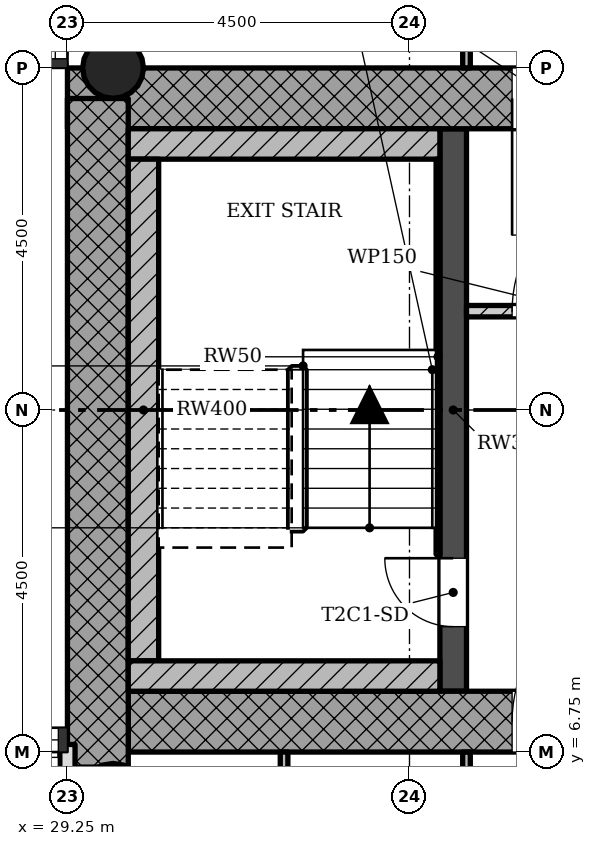
"""IFC4 building model, lengths in metres.
Left out: names, types, materials, properties, quantities, classifications, styles, units other than length and angle.
Written with IfcOpenShell. Run it as: python <this file> out.ifc"""

import sys

from ifc_helpers import new_model, si_unit, direction, frame, frame_2d, origin, origin_2d, place, context, subcontext, project, spatial, rectangle, hollow_circle, extrude, element, fill, save


model = new_model("IFC4")
c1 = context("Model", 3, precision=1e-05, world=origin(), true_north=direction((0.0, 1.0)))
c2 = subcontext(c1, "Body", "Model", "MODEL_VIEW")
j1 = project(units=[si_unit("LENGTHUNIT", "METRE"), si_unit("PLANEANGLEUNIT", "RADIAN")], contexts=[c1])
p1 = place(None, origin())
s1 = spatial("IfcSite", under=j1, at=p1, CompositionType="ELEMENT")
p2 = place(p1, origin())
s2 = spatial("IfcBuilding", under=s1, at=p2, CompositionType="ELEMENT")
p3 = place(p2, frame((0.0, 0.0, 154.1)))
s3 = spatial("IfcBuildingStorey", under=s2, at=p3, CompositionType="ELEMENT", Elevation=154.1)
p4 = place(p3, frame((30.05, 7.15, 0.0), z_axis=(0.0, 0.0, 1.0), x_axis=(1.0, 0.0, 0.0)))
e1 = element("IfcWall", 1, at=p4, inside=s3, PredefinedType="SHEAR", context=c2, shape_type="SweptSolid", body=[
    extrude(rectangle(XDim=12.7, YDim=0.8, at=frame_2d((6.35, 0.0))), origin(), (0.0, 0.0, 1.0), 3.4),
])
p5 = place(p4, frame((5.05, 0.0, 0.0)))
e2 = element("IfcOpeningElement", 2, at=p5, cuts=e1, PredefinedType="OPENING", context=c2, shape_type="SweptSolid", body=[
    extrude(rectangle(XDim=1.8, YDim=2.1, at=frame_2d((0.9, 1.05))), frame((0.0, 0.41, 0.0), z_axis=(0.0, -1.0, 0.0), x_axis=(1.0, 0.0, 0.0)), (0.0, 0.0, 1.0), 0.82),
])
p6 = place(p3, frame((41.95, 15.35, 0.0), z_axis=(0.0, 0.0, 1.0), x_axis=(-1.0, 0.0, 0.0)))
e3 = element("IfcWall", 3, at=p6, inside=s3, PredefinedType="SHEAR", context=c2, shape_type="SweptSolid", body=[
    extrude(rectangle(XDim=12.7, YDim=0.8, at=frame_2d((6.35, 0.0))), origin(), (0.0, 0.0, 1.0), 3.4),
])
p7 = place(p6, frame((5.05, 0.0, 0.0)))
e4 = element("IfcOpeningElement", 4, at=p7, cuts=e3, PredefinedType="OPENING", context=c2, shape_type="SweptSolid", body=[
    extrude(rectangle(XDim=1.8, YDim=2.1, at=frame_2d((0.9, 1.05))), frame((0.0, 0.41, 0.0), z_axis=(0.0, -1.0, 0.0), x_axis=(1.0, 0.0, 0.0)), (0.0, 0.0, 1.0), 0.82),
])
p8 = place(p3, frame((29.65, 15.348, 0.0), z_axis=(0.0, 0.0, 1.0), x_axis=(0.0, -1.0, 0.0)))
e5 = element("IfcWall", 5, at=p8, inside=s3, PredefinedType="SHEAR", context=c2, shape_type="SweptSolid", body=[
    extrude(rectangle(XDim=8.796, YDim=0.8, at=frame_2d((4.398, 0.0))), origin(), (0.0, 0.0, 1.0), 3.4),
])
p9 = place(p3, frame((34.325, 7.55, 0.0), z_axis=(0.0, 0.0, 1.0), x_axis=(0.0, 1.0, 0.0)))
e6 = element("IfcWall", 6, at=p9, inside=s3, PredefinedType="SHEAR", context=c2, shape_type="SweptSolid", body=[
    extrude(rectangle(XDim=7.4, YDim=0.35, at=frame_2d((3.7, 0.0))), origin(), (0.0, 0.0, 1.0), 3.4),
])
p10 = place(p9, frame((0.85, 0.0, 0.0)))
e7 = element("IfcOpeningElement", 7, at=p10, cuts=e6, PredefinedType="OPENING", context=c2, shape_type="SweptSolid", body=[
    extrude(rectangle(XDim=0.9, YDim=2.1, at=frame_2d((0.45, 1.05))), frame((0.0, 0.185, 0.0), z_axis=(0.0, -1.0, 0.0), x_axis=(1.0, 0.0, 0.0)), (0.0, 0.0, 1.0), 0.37),
])
p11 = place(p3, frame((29.85, 15.75, 0.0), z_axis=(0.0, 0.0, 1.0), x_axis=(1.0, 0.0, 0.0)))
e8 = element("IfcColumn", 8, at=p11, inside=s3, PredefinedType="COLUMN", context=c2, shape_type="SweptSolid", body=[
    extrude(hollow_circle(Radius=0.4, WallThickness=0.028, at=origin_2d()), origin(), (0.0, 0.0, 1.0), 3.4),
])
p12 = place(p3, frame((29.85, 6.15, 0.0), z_axis=(0.0, 0.0, 1.0), x_axis=(1.0, 0.0, 0.0)))
e9 = element("IfcColumn", 9, at=p12, inside=s3, PredefinedType="COLUMN", context=c2, shape_type="SweptSolid", body=[
    extrude(hollow_circle(Radius=0.45, WallThickness=0.032, at=origin_2d()), origin(), (0.0, 0.0, 1.0), 3.4),
])
p13 = place(p3, frame((37.5, 12.55, 0.0), z_axis=(0.0, 0.0, 1.0), x_axis=(-1.0, 0.0, 0.0)))
e10 = element("IfcWall", 10, at=p13, inside=s3, PredefinedType="PARTITIONING", context=c2, shape_type="SweptSolid", body=[
    extrude(rectangle(XDim=3.0, YDim=0.15, at=frame_2d((1.5, 0.0))), origin(), (0.0, 0.0, 1.0), 3.0),
])
p14 = place(p13, frame((0.6, 0.0, 0.0)))
e11 = element("IfcOpeningElement", 11, at=p14, cuts=e10, PredefinedType="OPENING", context=c2, shape_type="SweptSolid", body=[
    extrude(rectangle(XDim=1.8, YDim=2.1, at=frame_2d((0.9, 1.05))), frame((0.0, 0.085, 0.0), z_axis=(0.0, -1.0, 0.0), x_axis=(1.0, 0.0, 0.0)), (0.0, 0.0, 1.0), 0.17),
])
p15 = place(p3, frame((34.5, 4.5, 0.0), z_axis=(0.0, 0.0, 1.0), x_axis=(0.0, 1.0, 0.0)))
e12 = element("IfcWall", 12, at=p15, inside=s3, PredefinedType="PARTITIONING", context=c2, shape_type="SweptSolid", body=[
    extrude(rectangle(XDim=2.25, YDim=0.1, at=frame_2d((1.125, 0.0))), origin(), (0.0, 0.0, 1.0), 3.0),
])
p16 = place(p15, frame((0.675, 0.0, 0.0)))
e13 = element("IfcOpeningElement", 13, at=p16, cuts=e12, PredefinedType="OPENING", context=c2, shape_type="SweptSolid", body=[
    extrude(rectangle(XDim=0.9, YDim=2.1, at=frame_2d((0.45, 1.05))), frame((0.0, 0.06, 0.0), z_axis=(0.0, -1.0, 0.0), x_axis=(1.0, 0.0, 0.0)), (0.0, 0.0, 1.0), 0.12),
])
p17 = place(p3, frame((34.5, 15.75, 0.0), z_axis=(0.0, 0.0, 1.0), x_axis=(0.0, 1.0, 0.0)))
e14 = element("IfcWall", 14, at=p17, inside=s3, PredefinedType="PARTITIONING", context=c2, shape_type="SweptSolid", body=[
    extrude(rectangle(XDim=4.5, YDim=0.1, at=frame_2d((2.25, 0.0))), origin(), (0.0, 0.0, 1.0), 3.0),
])
p18 = place(p17, frame((1.8, 0.0, 0.0)))
e15 = element("IfcOpeningElement", 15, at=p18, cuts=e14, PredefinedType="OPENING", context=c2, shape_type="SweptSolid", body=[
    extrude(rectangle(XDim=0.9, YDim=2.1, at=frame_2d((0.45, 1.05))), frame((0.0, 0.06, 0.0), z_axis=(0.0, -1.0, 0.0), x_axis=(1.0, 0.0, 0.0)), (0.0, 0.0, 1.0), 0.12),
])
p19 = place(p3, frame((32.1, 4.5, 0.0), z_axis=(0.0, 0.0, 1.0), x_axis=(0.0, 1.0, 0.0)))
e16 = element("IfcWall", 16, at=p19, inside=s3, PredefinedType="PARTITIONING", context=c2, shape_type="SweptSolid", body=[
    extrude(rectangle(XDim=2.25, YDim=0.1, at=frame_2d((1.125, 0.0))), origin(), (0.0, 0.0, 1.0), 3.0),
])
p20 = place(p3, frame((29.25, -6.85, 0.0), z_axis=(0.0, 0.0, 1.0), x_axis=(0.0, 1.0, 0.0)))
e17 = element("IfcWall", 17, at=p20, inside=s3, PredefinedType="SOLIDWALL", context=c2, shape_type="SweptSolid", body=[
    extrude(rectangle(XDim=13.7, YDim=0.2, at=frame_2d((6.85, 0.0))), origin(), (0.0, 0.0, 1.0), 3.0),
])
p21 = place(p20, frame((6.4, 0.0, 0.0)))
e18 = element("IfcOpeningElement", 18, at=p21, cuts=e17, PredefinedType="OPENING", context=c2, shape_type="SweptSolid", body=[
    extrude(rectangle(XDim=0.9, YDim=2.1, at=frame_2d((0.45, 1.05))), frame((0.0, 0.11, 0.0), z_axis=(0.0, -1.0, 0.0), x_axis=(1.0, 0.0, 0.0)), (0.0, 0.0, 1.0), 0.22),
])
p22 = place(p3, frame((34.15, 14.75, 0.0), z_axis=(0.0, 0.0, 1.0), x_axis=(-1.0, 0.0, 0.0)))
e19 = element("IfcWall", 19, at=p22, inside=s3, PredefinedType="SHEAR", context=c2, shape_type="SweptSolid", body=[
    extrude(rectangle(XDim=4.1, YDim=0.4, at=frame_2d((2.05, 0.0))), origin(), (0.0, 0.0, 1.0), 3.4),
])
p23 = place(p3, frame((30.25, 7.95, 0.0), z_axis=(0.0, 0.0, 1.0), x_axis=(0.0, 1.0, 0.0)))
e20 = element("IfcWall", 20, at=p23, inside=s3, PredefinedType="SHEAR", context=c2, shape_type="SweptSolid", body=[
    extrude(rectangle(XDim=6.6, YDim=0.4, at=frame_2d((3.3, 0.0))), origin(), (0.0, 0.0, 1.0), 3.4),
])
p24 = place(p3, frame((34.15, 7.75, 0.0), z_axis=(0.0, 0.0, 1.0), x_axis=(-1.0, 0.0, 0.0)))
e21 = element("IfcWall", 21, at=p24, inside=s3, PredefinedType="SHEAR", context=c2, shape_type="SweptSolid", body=[
    extrude(rectangle(XDim=4.1, YDim=0.4, at=frame_2d((2.05, 0.0))), origin(), (0.0, 0.0, 1.0), 3.4),
])
p25 = place(p3, frame((34.125, 9.35, 0.0), z_axis=(0.0, 0.0, 1.0), x_axis=(0.0, 1.0, 0.0)))
e22 = element("IfcWall", 22, at=p25, inside=s3, PredefinedType="SHEAR", context=c2, shape_type="SweptSolid", body=[
    extrude(rectangle(XDim=5.2, YDim=0.05, at=frame_2d((2.6, 0.0))), origin(), (0.0, 0.0, 1.0), 3.4),
])
p26 = place(p14, origin())
e23 = element("IfcDoor", 23, at=p26, inside=s3, OperationType="SINGLE_SWING_LEFT", PredefinedType="DOOR", context=c2, shape_type="SweptSolid", body=[
    extrude(rectangle(XDim=1.8, YDim=2.1, at=frame_2d((0.9, 1.05))), frame((0.0, 0.025, 0.0), z_axis=(0.0, -1.0, 0.0), x_axis=(1.0, 0.0, 0.0)), (0.0, 0.0, 1.0), 0.05),
])
fill(e11, e23)
p27 = place(p10, origin())
e24 = element("IfcDoor", 24, at=p27, inside=s3, OperationType="SINGLE_SWING_LEFT", PredefinedType="DOOR", context=c2, shape_type="SweptSolid", body=[
    extrude(rectangle(XDim=0.9, YDim=2.1, at=frame_2d((0.45, 1.05))), frame((0.0, 0.025, 0.0), z_axis=(0.0, -1.0, 0.0), x_axis=(1.0, 0.0, 0.0)), (0.0, 0.0, 1.0), 0.05),
])
fill(e7, e24)
p28 = place(p5, origin())
e25 = element("IfcDoor", 25, at=p28, inside=s3, OperationType="SINGLE_SWING_LEFT", PredefinedType="DOOR", context=c2, shape_type="SweptSolid", body=[
    extrude(rectangle(XDim=1.8, YDim=2.1, at=frame_2d((0.9, 1.05))), frame((0.0, 0.025, 0.0), z_axis=(0.0, -1.0, 0.0), x_axis=(1.0, 0.0, 0.0)), (0.0, 0.0, 1.0), 0.05),
])
fill(e2, e25)
p29 = place(p7, origin())
e26 = element("IfcDoor", 26, at=p29, inside=s3, OperationType="SINGLE_SWING_LEFT", PredefinedType="DOOR", context=c2, shape_type="SweptSolid", body=[
    extrude(rectangle(XDim=1.8, YDim=2.1, at=frame_2d((0.9, 1.05))), frame((0.0, 0.025, 0.0), z_axis=(0.0, -1.0, 0.0), x_axis=(1.0, 0.0, 0.0)), (0.0, 0.0, 1.0), 0.05),
])
fill(e4, e26)
save(model, sys.argv[1])
